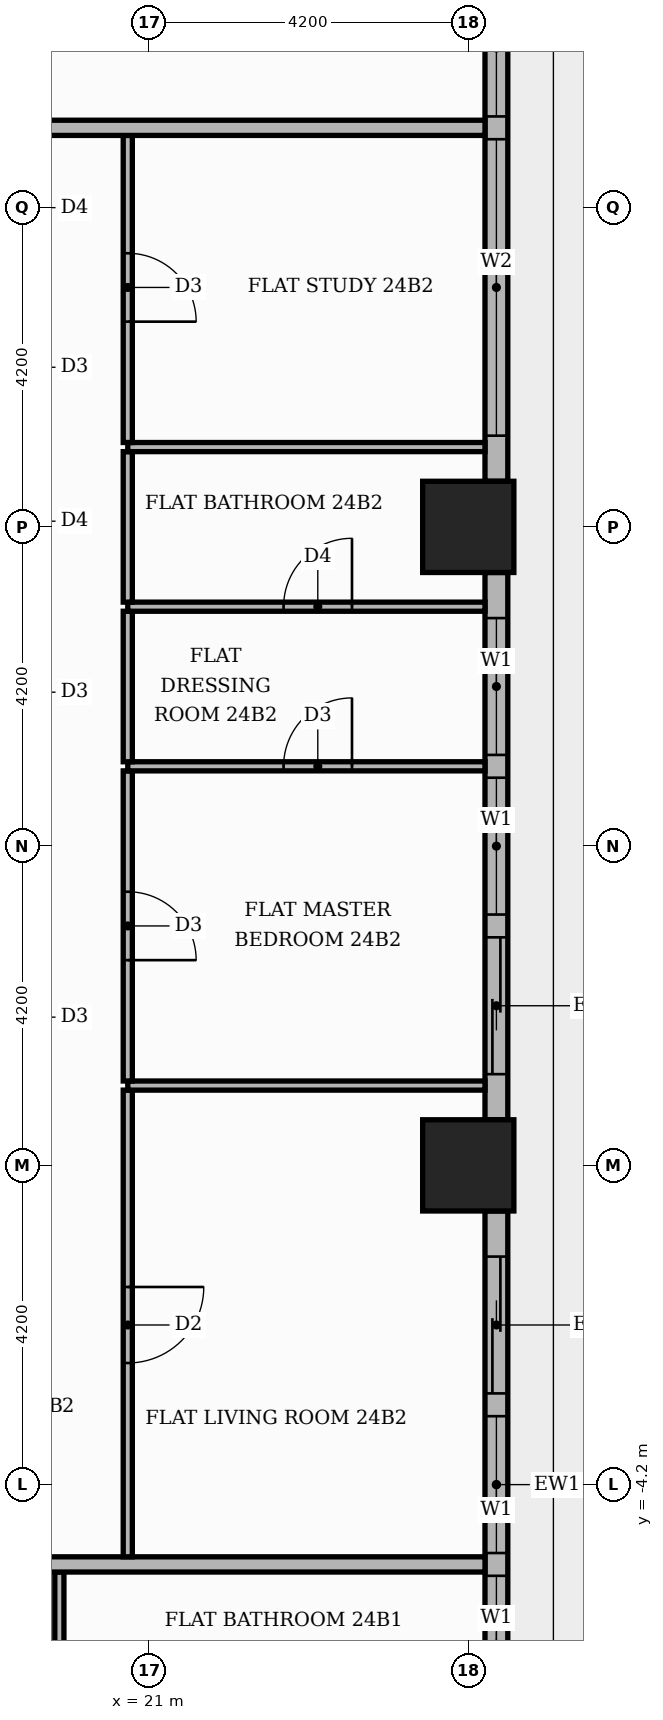
"""IFC4 building model, lengths in metres.
Left out: names, types, materials, properties, quantities, classifications, styles, units other than length and angle.
Written with IfcOpenShell. Run it as: python <this file> out.ifc"""

import sys

from ifc_helpers import new_model, si_unit, direction, frame, frame_2d, origin, origin_2d, place, context, subcontext, project, spatial, rectangle, extrude, element, fill, save


model = new_model("IFC4")
c1 = context("Model", 3, precision=1e-05, world=origin(), true_north=direction((0.0, 1.0)))
c2 = subcontext(c1, "Body", "Model", "MODEL_VIEW")
j1 = project(units=[si_unit("LENGTHUNIT", "METRE"), si_unit("PLANEANGLEUNIT", "RADIAN")], contexts=[c1])
p1 = place(None, origin())
s1 = spatial("IfcSite", under=j1, at=p1, CompositionType="ELEMENT")
p2 = place(p1, origin())
s2 = spatial("IfcBuilding", under=s1, at=p2, CompositionType="ELEMENT")
p3 = place(p2, frame((0.0, 0.0, 102.6)))
s3 = spatial("IfcBuildingStorey", under=s2, at=p3, CompositionType="ELEMENT", Elevation=102.6)
for number, where, z_axis, x_axis in (
    (1, (25.2, 0.0, 0.0), (0.0, 0.0, 1.0), (1.0, 0.0, 0.0)),
    (2, (25.2, 8.4, 0.0), (0.0, 0.0, 1.0), (1.0, 0.0, 0.0)),
):
    element("IfcColumn", number, at=place(p3, frame(where, z_axis=z_axis, x_axis=x_axis)), inside=s3, PredefinedType="COLUMN", context=c2, shape_type="SweptSolid", body=[
        extrude(rectangle(XDim=1.2, YDim=1.2, at=origin_2d()), origin(), (0.0, 0.0, 1.0), 3.9),
    ])
p4 = place(p3, frame((25.57, -7.8, 0.0), z_axis=(0.0, 0.0, 1.0), x_axis=(0.0, 1.0, 0.0)))
e3 = element("IfcWall", 3, at=p4, inside=s3, PredefinedType="STANDARD", context=c2, shape_type="SweptSolid", body=[
    extrude(rectangle(XDim=7.2, YDim=0.3, at=frame_2d((3.6, 0.0))), origin(), (0.0, 0.0, 1.0), 3.48),
])
p5 = place(p4, frame((0.6, 0.0, 0.9)))
e4 = element("IfcOpeningElement", 4, at=p5, cuts=e3, PredefinedType="OPENING", context=c2, shape_type="SweptSolid", body=[
    extrude(rectangle(XDim=1.8, YDim=2.1, at=frame_2d((0.9, 1.05))), frame((0.0, 0.16, 0.0), z_axis=(0.0, -1.0, 0.0), x_axis=(1.0, 0.0, 0.0)), (0.0, 0.0, 1.0), 0.32),
])
p6 = place(p4, frame((2.7, 0.0, 0.9)))
e5 = element("IfcOpeningElement", 5, at=p6, cuts=e3, PredefinedType="OPENING", context=c2, shape_type="SweptSolid", body=[
    extrude(rectangle(XDim=1.8, YDim=2.1, at=frame_2d((0.9, 1.05))), frame((0.0, 0.16, 0.0), z_axis=(0.0, -1.0, 0.0), x_axis=(1.0, 0.0, 0.0)), (0.0, 0.0, 1.0), 0.32),
])
p7 = place(p4, frame((4.8, 0.0, 0.0)))
e6 = element("IfcOpeningElement", 6, at=p7, cuts=e3, PredefinedType="OPENING", context=c2, shape_type="SweptSolid", body=[
    extrude(rectangle(XDim=1.8, YDim=2.4, at=frame_2d((0.9, 1.2))), frame((0.0, 0.16, 0.0), z_axis=(0.0, -1.0, 0.0), x_axis=(1.0, 0.0, 0.0)), (0.0, 0.0, 1.0), 0.32),
])
p8 = place(p3, frame((25.57, 0.6, 0.0), z_axis=(0.0, 0.0, 1.0), x_axis=(0.0, 1.0, 0.0)))
e7 = element("IfcWall", 7, at=p8, inside=s3, PredefinedType="STANDARD", context=c2, shape_type="SweptSolid", body=[
    extrude(rectangle(XDim=7.2, YDim=0.3, at=frame_2d((3.6, 0.0))), origin(), (0.0, 0.0, 1.0), 3.48),
])
p9 = place(p8, frame((0.6, 0.0, 0.0)))
e8 = element("IfcOpeningElement", 8, at=p9, cuts=e7, PredefinedType="OPENING", context=c2, shape_type="SweptSolid", body=[
    extrude(rectangle(XDim=1.8, YDim=2.4, at=frame_2d((0.9, 1.2))), frame((0.0, 0.16, 0.0), z_axis=(0.0, -1.0, 0.0), x_axis=(1.0, 0.0, 0.0)), (0.0, 0.0, 1.0), 0.32),
])
p10 = place(p8, frame((2.7, 0.0, 0.9)))
e9 = element("IfcOpeningElement", 9, at=p10, cuts=e7, PredefinedType="OPENING", context=c2, shape_type="SweptSolid", body=[
    extrude(rectangle(XDim=1.8, YDim=2.1, at=frame_2d((0.9, 1.05))), frame((0.0, 0.16, 0.0), z_axis=(0.0, -1.0, 0.0), x_axis=(1.0, 0.0, 0.0)), (0.0, 0.0, 1.0), 0.32),
])
p11 = place(p8, frame((4.8, 0.0, 0.9)))
e10 = element("IfcOpeningElement", 10, at=p11, cuts=e7, PredefinedType="OPENING", context=c2, shape_type="SweptSolid", body=[
    extrude(rectangle(XDim=1.8, YDim=2.1, at=frame_2d((0.9, 1.05))), frame((0.0, 0.16, 0.0), z_axis=(0.0, -1.0, 0.0), x_axis=(1.0, 0.0, 0.0)), (0.0, 0.0, 1.0), 0.32),
])
p12 = place(p3, frame((25.57, 9.0, 0.0), z_axis=(0.0, 0.0, 1.0), x_axis=(0.0, 1.0, 0.0)))
e11 = element("IfcWall", 11, at=p12, inside=s3, PredefinedType="STANDARD", context=c2, shape_type="SweptSolid", body=[
    extrude(rectangle(XDim=7.2, YDim=0.3, at=frame_2d((3.6, 0.0))), origin(), (0.0, 0.0, 1.0), 3.48),
])
p13 = place(p12, frame((0.6, 0.0, 0.9)))
e12 = element("IfcOpeningElement", 12, at=p13, cuts=e11, PredefinedType="OPENING", context=c2, shape_type="SweptSolid", body=[
    extrude(rectangle(XDim=3.9, YDim=2.1, at=frame_2d((1.95, 1.05))), frame((0.0, 0.16, 0.0), z_axis=(0.0, -1.0, 0.0), x_axis=(1.0, 0.0, 0.0)), (0.0, 0.0, 1.0), 0.32),
])
p14 = place(p12, frame((4.8, 0.0, 0.9)))
e13 = element("IfcOpeningElement", 13, at=p14, cuts=e11, PredefinedType="OPENING", context=c2, shape_type="SweptSolid", body=[
    extrude(rectangle(XDim=1.8, YDim=2.1, at=frame_2d((0.9, 1.05))), frame((0.0, 0.16, 0.0), z_axis=(0.0, -1.0, 0.0), x_axis=(1.0, 0.0, 0.0)), (0.0, 0.0, 1.0), 0.32),
])
p15 = place(p3, frame((19.82, -7.29, 0.0), z_axis=(0.0, 0.0, 1.0), x_axis=(0.0, 1.0, 0.0)))
e14 = element("IfcWall", 14, at=p15, inside=s3, PredefinedType="PARTITIONING", context=c2, shape_type="SweptSolid", body=[
    extrude(rectangle(XDim=1.94, YDim=0.12, at=frame_2d((0.97, 0.0))), origin(), (0.0, 0.0, 1.0), 3.48),
])
p16 = place(p3, frame((13.65, -5.25, 0.0), z_axis=(0.0, 0.0, 1.0), x_axis=(1.0, 0.0, 0.0)))
e15 = element("IfcWall", 15, at=p16, inside=s3, PredefinedType="PARTITIONING", context=c2, shape_type="SweptSolid", body=[
    extrude(rectangle(XDim=11.77, YDim=0.2, at=frame_2d((5.885, 0.0))), origin(), (0.0, 0.0, 1.0), 3.48),
])
p17 = place(p3, frame((20.72, -5.15, 0.0), z_axis=(0.0, 0.0, 1.0), x_axis=(0.0, 1.0, 0.0)))
e16 = element("IfcWall", 16, at=p17, inside=s3, PredefinedType="PARTITIONING", context=c2, shape_type="SweptSolid", body=[
    extrude(rectangle(XDim=6.14, YDim=0.12, at=frame_2d((3.07, 0.0))), origin(), (0.0, 0.0, 1.0), 3.48),
])
p18 = place(p17, frame((2.55, 0.0, 0.0)))
e17 = element("IfcOpeningElement", 17, at=p18, cuts=e16, PredefinedType="OPENING", context=c2, shape_type="SweptSolid", body=[
    extrude(rectangle(XDim=1.0, YDim=2.1, at=frame_2d((0.5, 1.05))), frame((0.0, 0.07, 0.0), z_axis=(0.0, -1.0, 0.0), x_axis=(1.0, 0.0, 0.0)), (0.0, 0.0, 1.0), 0.14),
])
p19 = place(p3, frame((20.72, 1.05, 0.0), z_axis=(0.0, 0.0, 1.0), x_axis=(1.0, 0.0, 0.0)))
e18 = element("IfcWall", 18, at=p19, inside=s3, PredefinedType="PARTITIONING", context=c2, shape_type="SweptSolid", body=[
    extrude(rectangle(XDim=4.7, YDim=0.12, at=frame_2d((2.35, 0.0))), origin(), (0.0, 0.0, 1.0), 3.48),
])
p20 = place(p3, frame((20.72, 1.11, 0.0), z_axis=(0.0, 0.0, 1.0), x_axis=(0.0, 1.0, 0.0)))
e19 = element("IfcWall", 19, at=p20, inside=s3, PredefinedType="PARTITIONING", context=c2, shape_type="SweptSolid", body=[
    extrude(rectangle(XDim=4.08, YDim=0.12, at=frame_2d((2.04, 0.0))), origin(), (0.0, 0.0, 1.0), 3.48),
])
p21 = place(p20, frame((1.59, 0.0, 0.0)))
e20 = element("IfcOpeningElement", 20, at=p21, cuts=e19, PredefinedType="OPENING", context=c2, shape_type="SweptSolid", body=[
    extrude(rectangle(XDim=0.9, YDim=2.1, at=frame_2d((0.45, 1.05))), frame((0.0, 0.07, 0.0), z_axis=(0.0, -1.0, 0.0), x_axis=(1.0, 0.0, 0.0)), (0.0, 0.0, 1.0), 0.14),
])
p22 = place(p3, frame((20.72, 5.25, 0.0), z_axis=(0.0, 0.0, 1.0), x_axis=(1.0, 0.0, 0.0)))
e21 = element("IfcWall", 21, at=p22, inside=s3, PredefinedType="PARTITIONING", context=c2, shape_type="SweptSolid", body=[
    extrude(rectangle(XDim=4.7, YDim=0.12, at=frame_2d((2.35, 0.0))), origin(), (0.0, 0.0, 1.0), 3.48),
])
p23 = place(p22, frame((2.05, 0.0, 0.0)))
e22 = element("IfcOpeningElement", 22, at=p23, cuts=e21, PredefinedType="OPENING", context=c2, shape_type="SweptSolid", body=[
    extrude(rectangle(XDim=0.9, YDim=2.1, at=frame_2d((0.45, 1.05))), frame((0.0, 0.07, 0.0), z_axis=(0.0, -1.0, 0.0), x_axis=(1.0, 0.0, 0.0)), (0.0, 0.0, 1.0), 0.14),
])
p24 = place(p3, frame((20.72, 5.31, 0.0), z_axis=(0.0, 0.0, 1.0), x_axis=(0.0, 1.0, 0.0)))
e23 = element("IfcWall", 23, at=p24, inside=s3, PredefinedType="PARTITIONING", context=c2, shape_type="SweptSolid", body=[
    extrude(rectangle(XDim=1.98, YDim=0.12, at=frame_2d((0.99, 0.0))), origin(), (0.0, 0.0, 1.0), 3.48),
])
p25 = place(p3, frame((20.72, 7.35, 0.0), z_axis=(0.0, 0.0, 1.0), x_axis=(1.0, 0.0, 0.0)))
e24 = element("IfcWall", 24, at=p25, inside=s3, PredefinedType="PARTITIONING", context=c2, shape_type="SweptSolid", body=[
    extrude(rectangle(XDim=4.7, YDim=0.12, at=frame_2d((2.35, 0.0))), origin(), (0.0, 0.0, 1.0), 3.48),
])
p26 = place(p25, frame((2.05, 0.0, 0.0)))
e25 = element("IfcOpeningElement", 25, at=p26, cuts=e24, PredefinedType="OPENING", context=c2, shape_type="SweptSolid", body=[
    extrude(rectangle(XDim=0.9, YDim=2.1, at=frame_2d((0.45, 1.05))), frame((0.0, 0.07, 0.0), z_axis=(0.0, -1.0, 0.0), x_axis=(1.0, 0.0, 0.0)), (0.0, 0.0, 1.0), 0.14),
])
p27 = place(p3, frame((20.72, 7.41, 0.0), z_axis=(0.0, 0.0, 1.0), x_axis=(0.0, 1.0, 0.0)))
e26 = element("IfcWall", 26, at=p27, inside=s3, PredefinedType="PARTITIONING", context=c2, shape_type="SweptSolid", body=[
    extrude(rectangle(XDim=1.98, YDim=0.12, at=frame_2d((0.99, 0.0))), origin(), (0.0, 0.0, 1.0), 3.48),
])
p28 = place(p3, frame((20.72, 9.45, 0.0), z_axis=(0.0, 0.0, 1.0), x_axis=(1.0, 0.0, 0.0)))
e27 = element("IfcWall", 27, at=p28, inside=s3, PredefinedType="PARTITIONING", context=c2, shape_type="SweptSolid", body=[
    extrude(rectangle(XDim=4.7, YDim=0.12, at=frame_2d((2.35, 0.0))), origin(), (0.0, 0.0, 1.0), 3.48),
])
p29 = place(p3, frame((20.72, 9.51, 0.0), z_axis=(0.0, 0.0, 1.0), x_axis=(0.0, 1.0, 0.0)))
e28 = element("IfcWall", 28, at=p29, inside=s3, PredefinedType="PARTITIONING", context=c2, shape_type="SweptSolid", body=[
    extrude(rectangle(XDim=4.04, YDim=0.12, at=frame_2d((2.02, 0.0))), origin(), (0.0, 0.0, 1.0), 3.48),
])
p30 = place(p29, frame((1.59, 0.0, 0.0)))
e29 = element("IfcOpeningElement", 29, at=p30, cuts=e28, PredefinedType="OPENING", context=c2, shape_type="SweptSolid", body=[
    extrude(rectangle(XDim=0.9, YDim=2.1, at=frame_2d((0.45, 1.05))), frame((0.0, 0.07, 0.0), z_axis=(0.0, -1.0, 0.0), x_axis=(1.0, 0.0, 0.0)), (0.0, 0.0, 1.0), 0.14),
])
p31 = place(p3, frame((-13.65, 13.65, 0.0), z_axis=(0.0, 0.0, 1.0), x_axis=(1.0, 0.0, 0.0)))
e30 = element("IfcWall", 30, at=p31, inside=s3, PredefinedType="PARTITIONING", context=c2, shape_type="SweptSolid", body=[
    extrude(rectangle(XDim=39.07, YDim=0.2, at=frame_2d((19.535, 0.0))), origin(), (0.0, 0.0, 1.0), 3.48),
])
p32 = place(p31, frame((24.65, 0.0, 0.0)))
e31 = element("IfcOpeningElement", 31, at=p32, cuts=e30, PredefinedType="OPENING", context=c2, shape_type="SweptSolid", body=[
    extrude(rectangle(XDim=1.1, YDim=2.4, at=frame_2d((0.55, 1.2))), frame((0.0, 0.11, 0.0), z_axis=(0.0, -1.0, 0.0), x_axis=(1.0, 0.0, 0.0)), (0.0, 0.0, 1.0), 0.22),
])
p33 = place(p31, frame((14.15, 0.0, 0.0)))
e32 = element("IfcOpeningElement", 32, at=p33, cuts=e30, PredefinedType="OPENING", context=c2, shape_type="SweptSolid", body=[
    extrude(rectangle(XDim=1.1, YDim=2.4, at=frame_2d((0.55, 1.2))), frame((0.0, 0.11, 0.0), z_axis=(0.0, -1.0, 0.0), x_axis=(1.0, 0.0, 0.0)), (0.0, 0.0, 1.0), 0.22),
])
p34 = place(p5, origin())
e33 = element("IfcWindow", 33, at=p34, inside=s3, PartitioningType="SINGLE_PANEL", PredefinedType="WINDOW", context=c2, shape_type="SweptSolid", body=[
    extrude(rectangle(XDim=1.8, YDim=2.1, at=frame_2d((0.9, 1.05))), frame((0.0, 0.03, 0.0), z_axis=(0.0, -1.0, 0.0), x_axis=(1.0, 0.0, 0.0)), (0.0, 0.0, 1.0), 0.06),
])
fill(e4, e33)
p35 = place(p6, origin())
e34 = element("IfcWindow", 34, at=p35, inside=s3, PartitioningType="SINGLE_PANEL", PredefinedType="WINDOW", context=c2, shape_type="SweptSolid", body=[
    extrude(rectangle(XDim=1.8, YDim=2.1, at=frame_2d((0.9, 1.05))), frame((0.0, 0.03, 0.0), z_axis=(0.0, -1.0, 0.0), x_axis=(1.0, 0.0, 0.0)), (0.0, 0.0, 1.0), 0.06),
])
fill(e5, e34)
p36 = place(p7, origin())
e35 = element("IfcDoor", 35, at=p36, inside=s3, OperationType="SLIDING_TO_RIGHT", PredefinedType="DOOR", context=c2, shape_type="SweptSolid", body=[
    extrude(rectangle(XDim=1.8, YDim=2.4, at=frame_2d((0.9, 1.2))), frame((0.0, 0.025, 0.0), z_axis=(0.0, -1.0, 0.0), x_axis=(1.0, 0.0, 0.0)), (0.0, 0.0, 1.0), 0.05),
])
fill(e6, e35)
p37 = place(p9, origin())
e36 = element("IfcDoor", 36, at=p37, inside=s3, OperationType="SLIDING_TO_LEFT", PredefinedType="DOOR", context=c2, shape_type="SweptSolid", body=[
    extrude(rectangle(XDim=1.8, YDim=2.4, at=frame_2d((0.9, 1.2))), frame((0.0, 0.025, 0.0), z_axis=(0.0, -1.0, 0.0), x_axis=(1.0, 0.0, 0.0)), (0.0, 0.0, 1.0), 0.05),
])
fill(e8, e36)
p38 = place(p10, origin())
e37 = element("IfcWindow", 37, at=p38, inside=s3, PartitioningType="SINGLE_PANEL", PredefinedType="WINDOW", context=c2, shape_type="SweptSolid", body=[
    extrude(rectangle(XDim=1.8, YDim=2.1, at=frame_2d((0.9, 1.05))), frame((0.0, 0.03, 0.0), z_axis=(0.0, -1.0, 0.0), x_axis=(1.0, 0.0, 0.0)), (0.0, 0.0, 1.0), 0.06),
])
fill(e9, e37)
p39 = place(p11, origin())
e38 = element("IfcWindow", 38, at=p39, inside=s3, PartitioningType="SINGLE_PANEL", PredefinedType="WINDOW", context=c2, shape_type="SweptSolid", body=[
    extrude(rectangle(XDim=1.8, YDim=2.1, at=frame_2d((0.9, 1.05))), frame((0.0, 0.03, 0.0), z_axis=(0.0, -1.0, 0.0), x_axis=(1.0, 0.0, 0.0)), (0.0, 0.0, 1.0), 0.06),
])
fill(e10, e38)
p40 = place(p13, origin())
e39 = element("IfcWindow", 39, at=p40, inside=s3, PartitioningType="SINGLE_PANEL", PredefinedType="WINDOW", context=c2, shape_type="SweptSolid", body=[
    extrude(rectangle(XDim=3.9, YDim=2.1, at=frame_2d((1.95, 1.05))), frame((0.0, 0.03, 0.0), z_axis=(0.0, -1.0, 0.0), x_axis=(1.0, 0.0, 0.0)), (0.0, 0.0, 1.0), 0.06),
])
fill(e12, e39)
p41 = place(p14, origin())
e40 = element("IfcWindow", 40, at=p41, inside=s3, PartitioningType="SINGLE_PANEL", PredefinedType="WINDOW", context=c2, shape_type="SweptSolid", body=[
    extrude(rectangle(XDim=1.8, YDim=2.1, at=frame_2d((0.9, 1.05))), frame((0.0, 0.03, 0.0), z_axis=(0.0, -1.0, 0.0), x_axis=(1.0, 0.0, 0.0)), (0.0, 0.0, 1.0), 0.06),
])
fill(e13, e40)
p42 = place(p18, frame((1.0, 0.0, 0.0), z_axis=(0.0, 0.0, 1.0), x_axis=(-1.0, 0.0, 0.0)))
e41 = element("IfcDoor", 41, at=p42, inside=s3, OperationType="SINGLE_SWING_RIGHT", PredefinedType="DOOR", context=c2, shape_type="SweptSolid", body=[
    extrude(rectangle(XDim=1.0, YDim=2.1, at=frame_2d((0.5, 1.05))), frame((0.0, 0.025, 0.0), z_axis=(0.0, -1.0, 0.0), x_axis=(1.0, 0.0, 0.0)), (0.0, 0.0, 1.0), 0.05),
])
fill(e17, e41)
p43 = place(p21, frame((0.9, 0.0, 0.0), z_axis=(0.0, 0.0, 1.0), x_axis=(-1.0, 0.0, 0.0)))
e42 = element("IfcDoor", 42, at=p43, inside=s3, OperationType="SINGLE_SWING_LEFT", PredefinedType="DOOR", context=c2, shape_type="SweptSolid", body=[
    extrude(rectangle(XDim=0.9, YDim=2.1, at=frame_2d((0.45, 1.05))), frame((0.0, 0.025, 0.0), z_axis=(0.0, -1.0, 0.0), x_axis=(1.0, 0.0, 0.0)), (0.0, 0.0, 1.0), 0.05),
])
fill(e20, e42)
p44 = place(p23, origin())
e43 = element("IfcDoor", 43, at=p44, inside=s3, OperationType="SINGLE_SWING_RIGHT", PredefinedType="DOOR", context=c2, shape_type="SweptSolid", body=[
    extrude(rectangle(XDim=0.9, YDim=2.1, at=frame_2d((0.45, 1.05))), frame((0.0, 0.025, 0.0), z_axis=(0.0, -1.0, 0.0), x_axis=(1.0, 0.0, 0.0)), (0.0, 0.0, 1.0), 0.05),
])
fill(e22, e43)
p45 = place(p26, origin())
e44 = element("IfcDoor", 44, at=p45, inside=s3, OperationType="SINGLE_SWING_RIGHT", PredefinedType="DOOR", context=c2, shape_type="SweptSolid", body=[
    extrude(rectangle(XDim=0.9, YDim=2.1, at=frame_2d((0.45, 1.05))), frame((0.0, 0.025, 0.0), z_axis=(0.0, -1.0, 0.0), x_axis=(1.0, 0.0, 0.0)), (0.0, 0.0, 1.0), 0.05),
])
fill(e25, e44)
p46 = place(p30, frame((0.9, 0.0, 0.0), z_axis=(0.0, 0.0, 1.0), x_axis=(-1.0, 0.0, 0.0)))
e45 = element("IfcDoor", 45, at=p46, inside=s3, OperationType="SINGLE_SWING_LEFT", PredefinedType="DOOR", context=c2, shape_type="SweptSolid", body=[
    extrude(rectangle(XDim=0.9, YDim=2.1, at=frame_2d((0.45, 1.05))), frame((0.0, 0.025, 0.0), z_axis=(0.0, -1.0, 0.0), x_axis=(1.0, 0.0, 0.0)), (0.0, 0.0, 1.0), 0.05),
])
fill(e29, e45)
save(model, sys.argv[1])
